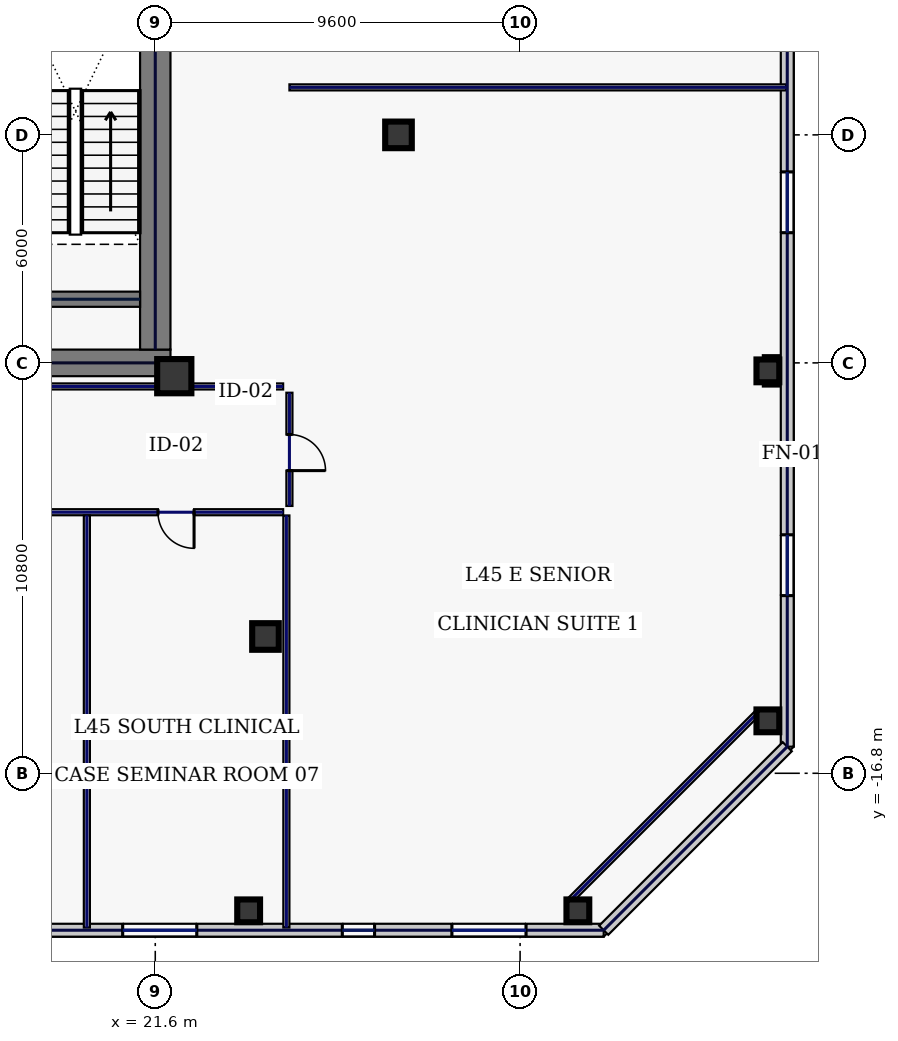
"""IFC4 building model, lengths in metres.
Left out: names, types, materials, properties, quantities, classifications, styles, units other than length and angle.
Written with IfcOpenShell. Run it as: python <this file> out.ifc"""

import sys

from ifc_helpers import new_model, si_unit, direction, frame, frame_2d, origin, origin_2d, place, context, subcontext, project, spatial, rectangle, hollow_rectangle, extrude, element, fill, save


model = new_model("IFC4")
c1 = context("Model", 3, precision=1e-05, world=origin(), true_north=direction((0.0, 1.0)))
c2 = subcontext(c1, "Body", "Model", "MODEL_VIEW")
j1 = project(units=[si_unit("LENGTHUNIT", "METRE"), si_unit("PLANEANGLEUNIT", "RADIAN")], contexts=[c1])
p1 = place(None, origin())
s1 = spatial("IfcSite", under=j1, at=p1, CompositionType="ELEMENT")
p2 = place(p1, origin())
s2 = spatial("IfcBuilding", under=s1, at=p2, CompositionType="ELEMENT")
p3 = place(p2, frame((0.0, 0.0, 196.2)))
s3 = spatial("IfcBuildingStorey", under=s2, at=p3, CompositionType="ELEMENT", Elevation=196.2)
p4 = place(p3, frame((10.45, -6.0, 0.0), z_axis=(0.0, 0.0, 1.0), x_axis=(1.0, 0.0, 0.0)))
e1 = element("IfcWall", 1, at=p4, inside=s3, PredefinedType="SHEAR", context=c2, shape_type="SweptSolid", body=[
    extrude(rectangle(XDim=11.55, YDim=0.7, at=frame_2d((5.775, 0.0))), origin(), (0.0, 0.0, 1.0), 3.74),
])
p5 = place(p3, frame((21.6, -5.65, 0.0), z_axis=(0.0, 0.0, 1.0), x_axis=(0.0, 1.0, 0.0)))
e2 = element("IfcWall", 2, at=p5, inside=s3, PredefinedType="SHEAR", context=c2, shape_type="SweptSolid", body=[
    extrude(rectangle(XDim=11.3, YDim=0.8, at=frame_2d((5.65, 0.0))), origin(), (0.0, 0.0, 1.0), 3.74),
])
p6 = place(p3, frame((17.8, -4.325, 0.0), z_axis=(0.0, 0.0, 1.0), x_axis=(1.0, 0.0, 0.0)))
e3 = element("IfcWall", 3, at=p6, inside=s3, PredefinedType="SHEAR", context=c2, shape_type="SweptSolid", body=[
    extrude(rectangle(XDim=3.4, YDim=0.4, at=frame_2d((1.7, 0.0))), origin(), (0.0, 0.0, 1.0), 3.74),
])
p7 = place(p3, frame((22.1, -6.35, 0.0), z_axis=(0.0, 0.0, 1.0), x_axis=(1.0, 0.0, 0.0)))
e4 = element("IfcColumn", 4, at=p7, inside=s3, PredefinedType="COLUMN", context=c2, shape_type="SweptSolid", body=[
    extrude(hollow_rectangle(XDim=0.9, YDim=0.9, WallThickness=0.04, at=origin_2d()), origin(), (0.0, 0.0, 1.0), 3.74),
])
for number, where, z_axis, x_axis in (
    (5, (24.5, -13.2, 0.0), (0.0, 0.0, 1.0), (1.0, 0.0, 0.0)),
    (6, (28.0, 0.0, 0.0), (0.0, 0.0, 1.0), (1.0, 0.0, 0.0)),
):
    element("IfcColumn", number, at=place(p3, frame(where, z_axis=z_axis, x_axis=x_axis)), inside=s3, PredefinedType="COLUMN", context=c2, shape_type="SweptSolid", body=[
        extrude(hollow_rectangle(XDim=0.7, YDim=0.7, WallThickness=0.032, at=origin_2d()), origin(), (0.0, 0.0, 1.0), 3.74),
    ])
for number, where, z_axis, x_axis in (
    (7, (24.057, -20.42, 0.0), (0.0, 0.0, 1.0), (1.0, 0.0, 0.0)),
    (8, (32.72, -20.42, 0.0), (0.0, 0.0, 1.0), (1.0, 0.0, 0.0)),
    (9, (37.72, -15.42, 0.0), (0.0, 0.0, 1.0), (1.0, 0.0, 0.0)),
    (10, (37.72, -6.21, 0.0), (0.0, 0.0, 1.0), (1.0, 0.0, 0.0)),
):
    element("IfcColumn", number, at=place(p3, frame(where, z_axis=z_axis, x_axis=x_axis)), inside=s3, PredefinedType="COLUMN", context=c2, shape_type="SweptSolid", body=[
        extrude(hollow_rectangle(XDim=0.6, YDim=0.6, WallThickness=0.028, at=origin_2d()), origin(), (0.0, 0.0, 1.0), 3.74),
    ])
p8 = place(p3, frame((13.463, -20.93, 0.0), z_axis=(0.0, 0.0, 1.0), x_axis=(1.0, 0.0, 0.0)))
e11 = element("IfcWall", 11, at=p8, inside=s3, PredefinedType="STANDARD", context=c2, shape_type="SweptSolid", body=[
    extrude(rectangle(XDim=19.937, YDim=0.34, at=frame_2d((9.969, 0.0))), origin(), (0.0, 0.0, 1.0), 3.74),
])
p9 = place(p8, frame((3.295, 0.0, 0.8)))
e12 = element("IfcOpeningElement", 12, at=p9, cuts=e11, PredefinedType="OPENING", context=c2, shape_type="SweptSolid", body=[
    extrude(rectangle(XDim=1.95, YDim=2.1, at=frame_2d((0.975, 1.05))), frame((0.0, 0.18, 0.0), z_axis=(0.0, -1.0, 0.0), x_axis=(1.0, 0.0, 0.0)), (0.0, 0.0, 1.0), 0.36),
])
p10 = place(p8, frame((7.28, 0.0, 0.8)))
e13 = element("IfcOpeningElement", 13, at=p10, cuts=e11, PredefinedType="OPENING", context=c2, shape_type="SweptSolid", body=[
    extrude(rectangle(XDim=1.95, YDim=2.1, at=frame_2d((0.975, 1.05))), frame((0.0, 0.18, 0.0), z_axis=(0.0, -1.0, 0.0), x_axis=(1.0, 0.0, 0.0)), (0.0, 0.0, 1.0), 0.36),
])
p11 = place(p8, frame((13.058, 0.0, 0.8)))
e14 = element("IfcOpeningElement", 14, at=p11, cuts=e11, PredefinedType="OPENING", context=c2, shape_type="SweptSolid", body=[
    extrude(rectangle(XDim=0.85, YDim=1.85, at=frame_2d((0.425, 0.925))), frame((0.0, 0.18, 0.0), z_axis=(0.0, -1.0, 0.0), x_axis=(1.0, 0.0, 0.0)), (0.0, 0.0, 1.0), 0.36),
])
p12 = place(p8, frame((15.943, 0.0, 0.8)))
e15 = element("IfcOpeningElement", 15, at=p12, cuts=e11, PredefinedType="OPENING", context=c2, shape_type="SweptSolid", body=[
    extrude(rectangle(XDim=1.95, YDim=2.1, at=frame_2d((0.975, 1.05))), frame((0.0, 0.18, 0.0), z_axis=(0.0, -1.0, 0.0), x_axis=(1.0, 0.0, 0.0)), (0.0, 0.0, 1.0), 0.36),
])
p13 = place(p3, frame((38.23, -16.1, 0.0), z_axis=(0.0, 0.0, 1.0), x_axis=(0.0, 1.0, 0.0)))
e16 = element("IfcWall", 16, at=p13, inside=s3, PredefinedType="STANDARD", context=c2, shape_type="SweptSolid", body=[
    extrude(rectangle(XDim=38.2, YDim=0.34, at=frame_2d((19.1, 0.0))), origin(), (0.0, 0.0, 1.0), 3.74),
])
p14 = place(p13, frame((3.975, 0.0, 0.58)))
e17 = element("IfcOpeningElement", 17, at=p14, cuts=e16, PredefinedType="OPENING", context=c2, shape_type="SweptSolid", body=[
    extrude(rectangle(XDim=1.6, YDim=2.3, at=frame_2d((0.8, 1.15))), frame((0.0, 0.18, 0.0), z_axis=(0.0, -1.0, 0.0), x_axis=(1.0, 0.0, 0.0)), (0.0, 0.0, 1.0), 0.36),
])
p15 = place(p13, frame((13.525, 0.0, 0.58)))
e18 = element("IfcOpeningElement", 18, at=p15, cuts=e16, PredefinedType="OPENING", context=c2, shape_type="SweptSolid", body=[
    extrude(rectangle(XDim=1.6, YDim=2.3, at=frame_2d((0.8, 1.15))), frame((0.0, 0.18, 0.0), z_axis=(0.0, -1.0, 0.0), x_axis=(1.0, 0.0, 0.0)), (0.0, 0.0, 1.0), 0.36),
])
p16 = place(p13, frame((23.075, 0.0, 0.58)))
e19 = element("IfcOpeningElement", 19, at=p16, cuts=e16, PredefinedType="OPENING", context=c2, shape_type="SweptSolid", body=[
    extrude(rectangle(XDim=1.6, YDim=2.3, at=frame_2d((0.8, 1.15))), frame((0.0, 0.18, 0.0), z_axis=(0.0, -1.0, 0.0), x_axis=(1.0, 0.0, 0.0)), (0.0, 0.0, 1.0), 0.36),
])
p17 = place(p13, frame((32.625, 0.0, 0.58)))
e20 = element("IfcOpeningElement", 20, at=p17, cuts=e16, PredefinedType="OPENING", context=c2, shape_type="SweptSolid", body=[
    extrude(rectangle(XDim=1.6, YDim=2.3, at=frame_2d((0.8, 1.15))), frame((0.0, 0.18, 0.0), z_axis=(0.0, -1.0, 0.0), x_axis=(1.0, 0.0, 0.0)), (0.0, 0.0, 1.0), 0.36),
])
p18 = place(p3, frame((33.4, -20.93, 0.0), z_axis=(0.0, 0.0, 1.0), x_axis=(0.707124652085, 0.707088909836, 0.0)))
e21 = element("IfcWall", 21, at=p18, inside=s3, PredefinedType="STANDARD", context=c2, shape_type="SweptSolid", body=[
    extrude(rectangle(XDim=6.831, YDim=0.34, at=frame_2d((3.415, 0.0))), origin(), (0.0, 0.0, 1.0), 3.74),
])
p19 = place(p3, frame((32.479, -20.18, 0.0), z_axis=(0.0, 0.0, 1.0), x_axis=(0.707106781187, 0.707106781187, 0.0)))
e22 = element("IfcWall", 22, at=p19, inside=s3, PredefinedType="PARTITIONING", context=c2, shape_type="SweptSolid", body=[
    extrude(rectangle(XDim=7.071, YDim=0.16, at=frame_2d((3.536, 0.0))), origin(), (0.0, 0.0, 1.0), 3.74),
])
p20 = place(p3, frame((10.63, -6.62, 0.0), z_axis=(0.0, 0.0, 1.0), x_axis=(1.0, 0.0, 0.0)))
e23 = element("IfcWall", 23, at=p20, inside=s3, PredefinedType="PARTITIONING", context=c2, shape_type="SweptSolid", body=[
    extrude(rectangle(XDim=14.335, YDim=0.16, at=frame_2d((7.167, 0.0))), origin(), (0.0, 0.0, 1.0), 3.74),
])
p21 = place(p3, frame((25.13, -6.785, 0.0), z_axis=(0.0, 0.0, 1.0), x_axis=(0.0, -1.0, 0.0)))
e24 = element("IfcWall", 24, at=p21, inside=s3, PredefinedType="PARTITIONING", context=c2, shape_type="SweptSolid", body=[
    extrude(rectangle(XDim=2.98, YDim=0.16, at=frame_2d((1.49, 0.0))), origin(), (0.0, 0.0, 1.0), 3.74),
])
p22 = place(p21, frame((1.1, 0.0, 0.0)))
e25 = element("IfcOpeningElement", 25, at=p22, cuts=e24, PredefinedType="OPENING", context=c2, shape_type="SweptSolid", body=[
    extrude(rectangle(XDim=0.95, YDim=2.2, at=frame_2d((0.475, 1.1))), frame((0.0, 0.09, 0.0), z_axis=(0.0, -1.0, 0.0), x_axis=(1.0, 0.0, 0.0)), (0.0, 0.0, 1.0), 0.18),
])
p23 = place(p3, frame((24.965, -9.93, 0.0), z_axis=(0.0, 0.0, 1.0), x_axis=(-1.0, 0.0, 0.0)))
e26 = element("IfcWall", 26, at=p23, inside=s3, PredefinedType="PARTITIONING", context=c2, shape_type="SweptSolid", body=[
    extrude(rectangle(XDim=49.93, YDim=0.16, at=frame_2d((24.965, 0.0))), origin(), (0.0, 0.0, 1.0), 3.74),
])
p24 = place(p23, frame((47.106, 0.0, 0.0)))
e27 = element("IfcOpeningElement", 27, at=p24, cuts=e26, PredefinedType="OPENING", context=c2, shape_type="SweptSolid", body=[
    extrude(rectangle(XDim=0.95, YDim=2.2, at=frame_2d((0.475, 1.1))), frame((0.0, 0.09, 0.0), z_axis=(0.0, -1.0, 0.0), x_axis=(1.0, 0.0, 0.0)), (0.0, 0.0, 1.0), 0.18),
])
p25 = place(p23, frame((41.375, 0.0, 0.0)))
e28 = element("IfcOpeningElement", 28, at=p25, cuts=e26, PredefinedType="OPENING", context=c2, shape_type="SweptSolid", body=[
    extrude(rectangle(XDim=0.95, YDim=2.2, at=frame_2d((0.475, 1.1))), frame((0.0, 0.09, 0.0), z_axis=(0.0, -1.0, 0.0), x_axis=(1.0, 0.0, 0.0)), (0.0, 0.0, 1.0), 0.18),
])
p26 = place(p23, frame((33.875, 0.0, 0.0)))
e29 = element("IfcOpeningElement", 29, at=p26, cuts=e26, PredefinedType="OPENING", context=c2, shape_type="SweptSolid", body=[
    extrude(rectangle(XDim=0.95, YDim=2.2, at=frame_2d((0.475, 1.1))), frame((0.0, 0.09, 0.0), z_axis=(0.0, -1.0, 0.0), x_axis=(1.0, 0.0, 0.0)), (0.0, 0.0, 1.0), 0.18),
])
p27 = place(p23, frame((25.3, 0.0, 0.0)))
e30 = element("IfcOpeningElement", 30, at=p27, cuts=e26, PredefinedType="OPENING", context=c2, shape_type="SweptSolid", body=[
    extrude(rectangle(XDim=1.3, YDim=2.2, at=frame_2d((0.65, 1.1))), frame((0.0, 0.09, 0.0), z_axis=(0.0, -1.0, 0.0), x_axis=(1.0, 0.0, 0.0)), (0.0, 0.0, 1.0), 0.18),
])
p28 = place(p23, frame((16.4, 0.0, 0.0)))
e31 = element("IfcOpeningElement", 31, at=p28, cuts=e26, PredefinedType="OPENING", context=c2, shape_type="SweptSolid", body=[
    extrude(rectangle(XDim=1.3, YDim=2.2, at=frame_2d((0.65, 1.1))), frame((0.0, 0.09, 0.0), z_axis=(0.0, -1.0, 0.0), x_axis=(1.0, 0.0, 0.0)), (0.0, 0.0, 1.0), 0.18),
])
p29 = place(p23, frame((8.475, 0.0, 0.0)))
e32 = element("IfcOpeningElement", 32, at=p29, cuts=e26, PredefinedType="OPENING", context=c2, shape_type="SweptSolid", body=[
    extrude(rectangle(XDim=0.95, YDim=2.2, at=frame_2d((0.475, 1.1))), frame((0.0, 0.09, 0.0), z_axis=(0.0, -1.0, 0.0), x_axis=(1.0, 0.0, 0.0)), (0.0, 0.0, 1.0), 0.18),
])
p30 = place(p23, frame((2.344, 0.0, 0.0)))
e33 = element("IfcOpeningElement", 33, at=p30, cuts=e26, PredefinedType="OPENING", context=c2, shape_type="SweptSolid", body=[
    extrude(rectangle(XDim=0.95, YDim=2.2, at=frame_2d((0.475, 1.1))), frame((0.0, 0.09, 0.0), z_axis=(0.0, -1.0, 0.0), x_axis=(1.0, 0.0, 0.0)), (0.0, 0.0, 1.0), 0.18),
])
for number, where, z_axis, x_axis in (
    (34, (25.05, -20.86, 0.0), (0.0, 0.0, 1.0), (0.0, 1.0, 0.0)),
    (35, (19.8, -20.86, 0.0), (0.0, 0.0, 1.0), (0.0, 1.0, 0.0)),
):
    element("IfcWall", number, at=place(p3, frame(where, z_axis=z_axis, x_axis=x_axis)), inside=s3, PredefinedType="PARTITIONING", context=c2, shape_type="SweptSolid", body=[
        extrude(rectangle(XDim=10.845, YDim=0.16, at=frame_2d((5.423, 0.0))), origin(), (0.0, 0.0, 1.0), 3.74),
    ])
p31 = place(p3, frame((25.13, 1.25, 0.0), z_axis=(0.0, 0.0, 1.0), x_axis=(1.0, 0.0, 0.0)))
e36 = element("IfcWall", 36, at=p31, inside=s3, PredefinedType="PARTITIONING", context=c2, shape_type="SweptSolid", body=[
    extrude(rectangle(XDim=13.08, YDim=0.16, at=frame_2d((6.54, 0.0))), origin(), (0.0, 0.0, 1.0), 3.285),
])
p32 = place(p10, origin())
e37 = element("IfcWindow", 37, at=p32, inside=s3, PartitioningType="SINGLE_PANEL", PredefinedType="WINDOW", context=c2, shape_type="SweptSolid", body=[
    extrude(rectangle(XDim=1.95, YDim=2.1, at=frame_2d((0.975, 1.05))), frame((0.0, 0.03, 0.0), z_axis=(0.0, -1.0, 0.0), x_axis=(1.0, 0.0, 0.0)), (0.0, 0.0, 1.0), 0.06),
])
fill(e13, e37)
p33 = place(p11, origin())
e38 = element("IfcWindow", 38, at=p33, inside=s3, PartitioningType="SINGLE_PANEL", PredefinedType="WINDOW", context=c2, shape_type="SweptSolid", body=[
    extrude(rectangle(XDim=0.85, YDim=1.85, at=frame_2d((0.425, 0.925))), frame((0.0, 0.03, 0.0), z_axis=(0.0, -1.0, 0.0), x_axis=(1.0, 0.0, 0.0)), (0.0, 0.0, 1.0), 0.06),
])
fill(e14, e38)
p34 = place(p12, origin())
e39 = element("IfcWindow", 39, at=p34, inside=s3, PartitioningType="SINGLE_PANEL", PredefinedType="WINDOW", context=c2, shape_type="SweptSolid", body=[
    extrude(rectangle(XDim=1.95, YDim=2.1, at=frame_2d((0.975, 1.05))), frame((0.0, 0.03, 0.0), z_axis=(0.0, -1.0, 0.0), x_axis=(1.0, 0.0, 0.0)), (0.0, 0.0, 1.0), 0.06),
])
fill(e15, e39)
p35 = place(p14, origin())
e40 = element("IfcWindow", 40, at=p35, inside=s3, PartitioningType="SINGLE_PANEL", PredefinedType="WINDOW", context=c2, shape_type="SweptSolid", body=[
    extrude(rectangle(XDim=1.6, YDim=2.3, at=frame_2d((0.8, 1.15))), frame((0.0, 0.03, 0.0), z_axis=(0.0, -1.0, 0.0), x_axis=(1.0, 0.0, 0.0)), (0.0, 0.0, 1.0), 0.06),
])
fill(e17, e40)
p36 = place(p15, origin())
e41 = element("IfcWindow", 41, at=p36, inside=s3, PartitioningType="SINGLE_PANEL", PredefinedType="WINDOW", context=c2, shape_type="SweptSolid", body=[
    extrude(rectangle(XDim=1.6, YDim=2.3, at=frame_2d((0.8, 1.15))), frame((0.0, 0.03, 0.0), z_axis=(0.0, -1.0, 0.0), x_axis=(1.0, 0.0, 0.0)), (0.0, 0.0, 1.0), 0.06),
])
fill(e18, e41)
p37 = place(p30, origin())
e42 = element("IfcDoor", 42, at=p37, inside=s3, OperationType="SINGLE_SWING_LEFT", PredefinedType="DOOR", context=c2, shape_type="SweptSolid", body=[
    extrude(rectangle(XDim=0.95, YDim=2.2, at=frame_2d((0.475, 1.1))), frame((0.0, 0.025, 0.0), z_axis=(0.0, -1.0, 0.0), x_axis=(1.0, 0.0, 0.0)), (0.0, 0.0, 1.0), 0.05),
])
fill(e33, e42)
p38 = place(p22, origin())
e43 = element("IfcDoor", 43, at=p38, inside=s3, OperationType="SINGLE_SWING_RIGHT", PredefinedType="DOOR", context=c2, shape_type="SweptSolid", body=[
    extrude(rectangle(XDim=0.95, YDim=2.2, at=frame_2d((0.475, 1.1))), frame((0.0, 0.025, 0.0), z_axis=(0.0, -1.0, 0.0), x_axis=(1.0, 0.0, 0.0)), (0.0, 0.0, 1.0), 0.05),
])
fill(e25, e43)
save(model, sys.argv[1])
